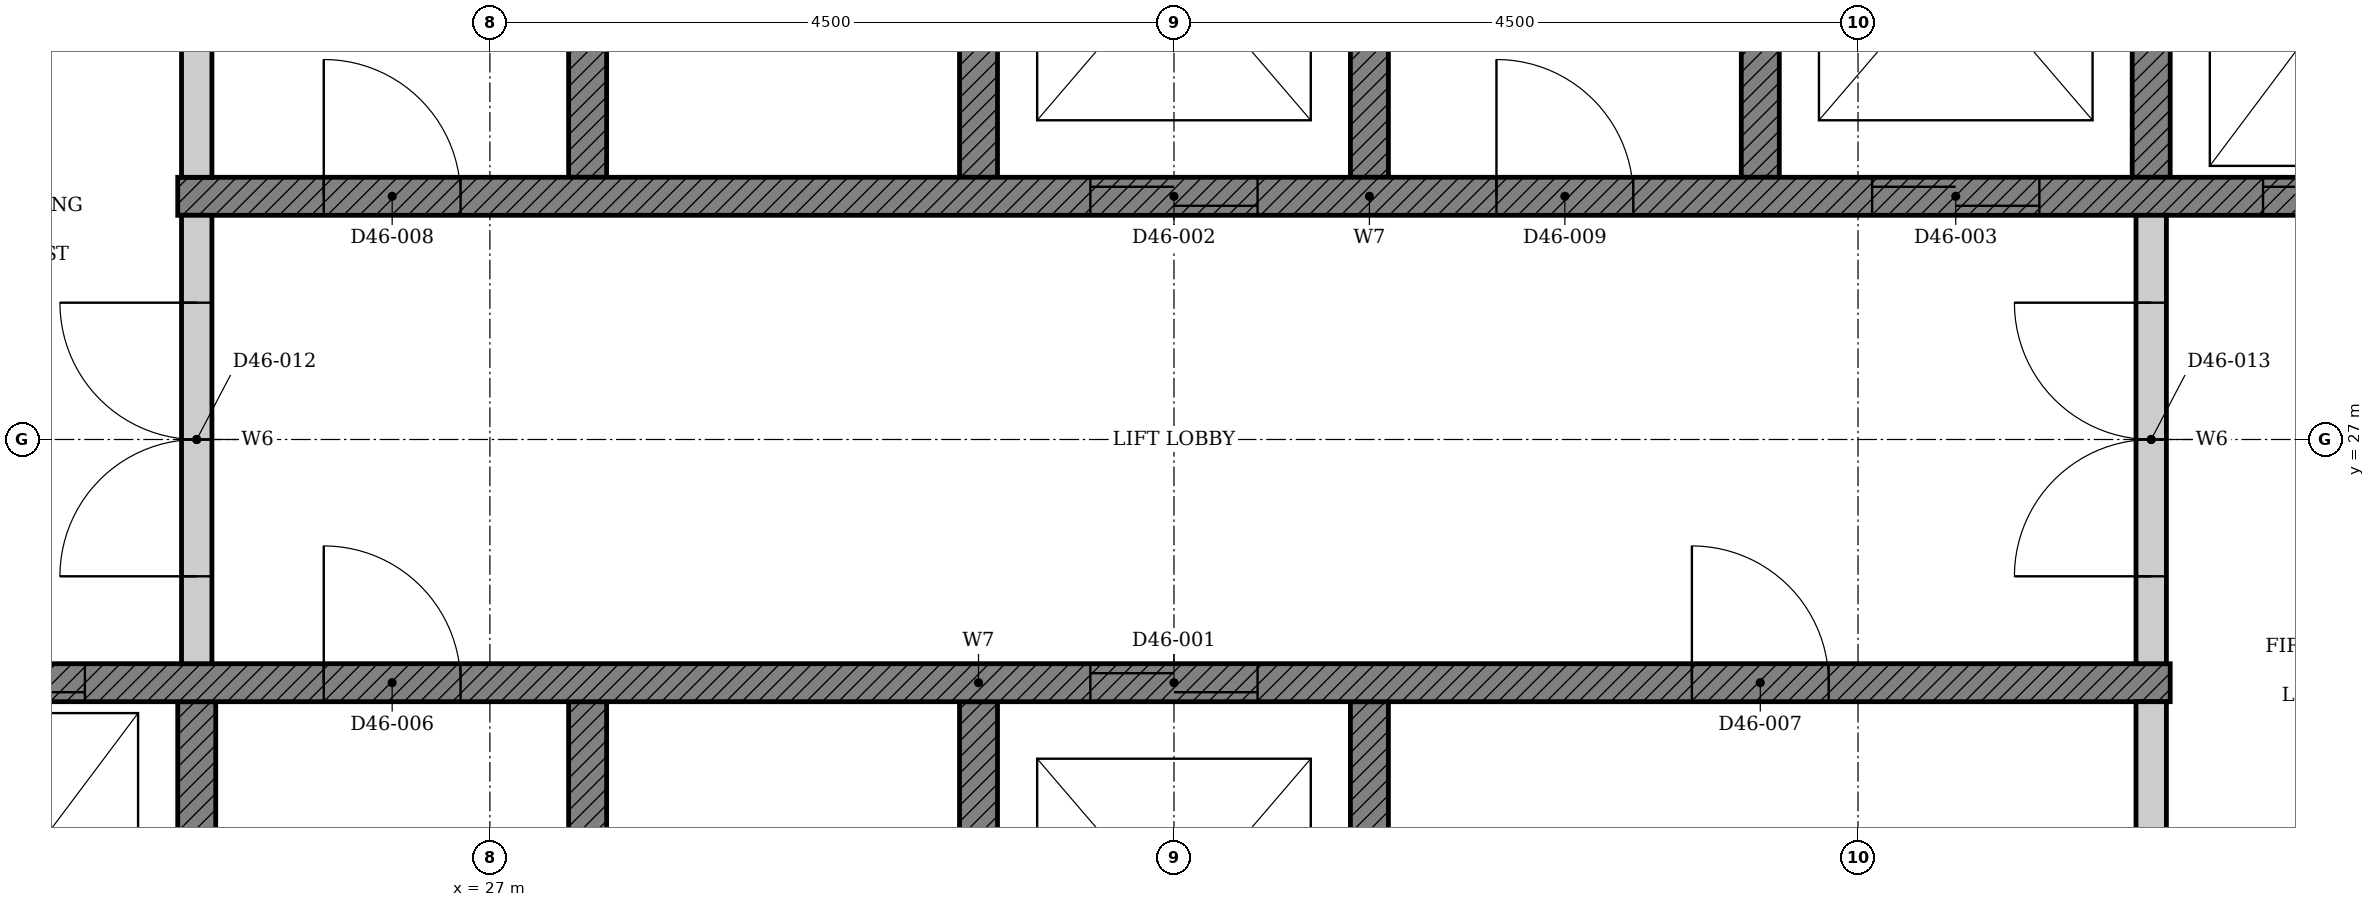
"""IFC4 building model, lengths in metres.
Left out: names, types, materials, properties, quantities, classifications, styles, units other than length and angle.
Written with IfcOpenShell. Run it as: python <this file> out.ifc"""

import sys

from ifc_helpers import new_model, si_unit, direction, frame, frame_2d, origin, place, context, subcontext, project, spatial, polyline, rectangle, outline, extrude, element, fill, save


model = new_model("IFC4")
c1 = context("Model", 3, precision=1e-05, world=origin(), true_north=direction((0.0, 1.0)))
c2 = subcontext(c1, "Body", "Model", "MODEL_VIEW")
j1 = project(units=[si_unit("LENGTHUNIT", "METRE"), si_unit("PLANEANGLEUNIT", "RADIAN")], contexts=[c1])
p1 = place(None, origin())
s1 = spatial("IfcSite", under=j1, at=p1, CompositionType="ELEMENT")
p2 = place(p1, origin())
s2 = spatial("IfcBuilding", under=s1, at=p2, CompositionType="ELEMENT")
p3 = place(p2, frame((0.0, 0.0, 183.9)))
s3 = spatial("IfcBuildingStorey", under=s2, at=p3, CompositionType="ELEMENT", Elevation=183.9)
p4 = place(p3, origin())
e1 = element("IfcWall", 1, at=p4, inside=s3, PredefinedType="SHEAR", context=c2, shape_type="SweptSolid", body=[
    extrude(outline(polyline([(22.375, 22.35), (25.197, 22.35), (25.197, 25.275), (24.947, 25.275), (24.947, 22.65), (22.625, 22.65), (22.625, 25.275), (22.375, 25.275), (22.375, 22.35)])), origin(), (0.0, 0.0, 1.0), 3.3),
])
p5 = place(p3, origin())
e2 = element("IfcWall", 2, at=p5, inside=s3, PredefinedType="SHEAR", context=c2, shape_type="SweptSolid", body=[
    extrude(outline(polyline([(27.518, 22.35), (32.911, 22.35), (32.911, 25.275), (32.661, 25.275), (32.661, 22.65), (30.339, 22.65), (30.339, 25.275), (30.089, 25.275), (30.089, 22.65), (27.768, 22.65), (27.768, 25.275), (27.518, 25.275), (27.518, 22.35)])), origin(), (0.0, 0.0, 1.0), 3.3),
])
p6 = place(p3, origin())
e3 = element("IfcWall", 3, at=p6, inside=s3, PredefinedType="SHEAR", context=c2, shape_type="SweptSolid", body=[
    extrude(outline(polyline([(27.518, 28.725), (27.768, 28.725), (27.768, 31.35), (30.089, 31.35), (30.089, 28.725), (30.339, 28.725), (30.339, 31.35), (32.661, 31.35), (32.661, 28.725), (32.911, 28.725), (32.911, 31.65), (27.518, 31.65), (27.518, 28.725)])), origin(), (0.0, 0.0, 1.0), 3.3),
])
p7 = place(p3, origin())
e4 = element("IfcWall", 4, at=p7, inside=s3, PredefinedType="SHEAR", context=c2, shape_type="SweptSolid", body=[
    extrude(outline(polyline([(35.232, 28.725), (35.482, 28.725), (35.482, 31.35), (37.803, 31.35), (37.803, 28.725), (38.053, 28.725), (38.053, 31.35), (40.375, 31.35), (40.375, 28.725), (40.625, 28.725), (40.625, 31.65), (35.232, 31.65), (35.232, 28.725)])), origin(), (0.0, 0.0, 1.0), 3.3),
])
p8 = place(p3, frame((22.375, 25.4, 0.0), z_axis=(0.0, 0.0, 1.0), x_axis=(1.0, 0.0, 0.0)))
e5 = element("IfcWall", 5, at=p8, inside=s3, PredefinedType="SHEAR", context=c2, shape_type="SweptSolid", body=[
    extrude(rectangle(XDim=15.678, YDim=0.25, at=frame_2d((7.839, 0.0))), origin(), (0.0, 0.0, 1.0), 3.3),
])
p9 = place(p8, frame((8.575, 0.0, 0.0)))
e6 = element("IfcOpeningElement", 6, at=p9, cuts=e5, PredefinedType="OPENING", context=c2, shape_type="SweptSolid", body=[
    extrude(rectangle(XDim=1.1, YDim=2.1, at=frame_2d((0.55, 1.05))), frame((0.0, 0.135, 0.0), z_axis=(0.0, -1.0, 0.0), x_axis=(1.0, 0.0, 0.0)), (0.0, 0.0, 1.0), 0.27),
])
p10 = place(p8, frame((0.861, 0.0, 0.0)))
e7 = element("IfcOpeningElement", 7, at=p10, cuts=e5, PredefinedType="OPENING", context=c2, shape_type="SweptSolid", body=[
    extrude(rectangle(XDim=1.1, YDim=2.1, at=frame_2d((0.55, 1.05))), frame((0.0, 0.135, 0.0), z_axis=(0.0, -1.0, 0.0), x_axis=(1.0, 0.0, 0.0)), (0.0, 0.0, 1.0), 0.27),
])
p11 = place(p8, frame((3.532, 0.0, 0.0)))
e8 = element("IfcOpeningElement", 8, at=p11, cuts=e5, PredefinedType="OPENING", context=c2, shape_type="SweptSolid", body=[
    extrude(rectangle(XDim=0.9, YDim=2.1, at=frame_2d((0.45, 1.05))), frame((0.0, 0.135, 0.0), z_axis=(0.0, -1.0, 0.0), x_axis=(1.0, 0.0, 0.0)), (0.0, 0.0, 1.0), 0.27),
])
p12 = place(p8, frame((12.532, 0.0, 0.0)))
e9 = element("IfcOpeningElement", 9, at=p12, cuts=e5, PredefinedType="OPENING", context=c2, shape_type="SweptSolid", body=[
    extrude(rectangle(XDim=0.9, YDim=2.1, at=frame_2d((0.45, 1.05))), frame((0.0, 0.135, 0.0), z_axis=(0.0, -1.0, 0.0), x_axis=(1.0, 0.0, 0.0)), (0.0, 0.0, 1.0), 0.27),
])
p13 = place(p3, frame((24.947, 28.6, 0.0), z_axis=(0.0, 0.0, 1.0), x_axis=(1.0, 0.0, 0.0)))
e10 = element("IfcWall", 10, at=p13, inside=s3, PredefinedType="SHEAR", context=c2, shape_type="SweptSolid", body=[
    extrude(rectangle(XDim=15.678, YDim=0.25, at=frame_2d((7.839, 0.0))), origin(), (0.0, 0.0, 1.0), 3.3),
])
p14 = place(p13, frame((6.004, 0.0, 0.0)))
e11 = element("IfcOpeningElement", 11, at=p14, cuts=e10, PredefinedType="OPENING", context=c2, shape_type="SweptSolid", body=[
    extrude(rectangle(XDim=1.1, YDim=2.1, at=frame_2d((0.55, 1.05))), frame((0.0, 0.135, 0.0), z_axis=(0.0, -1.0, 0.0), x_axis=(1.0, 0.0, 0.0)), (0.0, 0.0, 1.0), 0.27),
])
p15 = place(p13, frame((11.146, 0.0, 0.0)))
e12 = element("IfcOpeningElement", 12, at=p15, cuts=e10, PredefinedType="OPENING", context=c2, shape_type="SweptSolid", body=[
    extrude(rectangle(XDim=1.1, YDim=2.1, at=frame_2d((0.55, 1.05))), frame((0.0, 0.135, 0.0), z_axis=(0.0, -1.0, 0.0), x_axis=(1.0, 0.0, 0.0)), (0.0, 0.0, 1.0), 0.27),
])
p16 = place(p13, frame((13.718, 0.0, 0.0)))
e13 = element("IfcOpeningElement", 13, at=p16, cuts=e10, PredefinedType="OPENING", context=c2, shape_type="SweptSolid", body=[
    extrude(rectangle(XDim=1.1, YDim=2.1, at=frame_2d((0.55, 1.05))), frame((0.0, 0.135, 0.0), z_axis=(0.0, -1.0, 0.0), x_axis=(1.0, 0.0, 0.0)), (0.0, 0.0, 1.0), 0.27),
])
p17 = place(p13, frame((0.961, 0.0, 0.0)))
e14 = element("IfcOpeningElement", 14, at=p17, cuts=e10, PredefinedType="OPENING", context=c2, shape_type="SweptSolid", body=[
    extrude(rectangle(XDim=0.9, YDim=2.1, at=frame_2d((0.45, 1.05))), frame((0.0, 0.135, 0.0), z_axis=(0.0, -1.0, 0.0), x_axis=(1.0, 0.0, 0.0)), (0.0, 0.0, 1.0), 0.27),
])
p18 = place(p13, frame((8.675, 0.0, 0.0)))
e15 = element("IfcOpeningElement", 15, at=p18, cuts=e10, PredefinedType="OPENING", context=c2, shape_type="SweptSolid", body=[
    extrude(rectangle(XDim=0.9, YDim=2.1, at=frame_2d((0.45, 1.05))), frame((0.0, 0.135, 0.0), z_axis=(0.0, -1.0, 0.0), x_axis=(1.0, 0.0, 0.0)), (0.0, 0.0, 1.0), 0.27),
])
for number, where, z_axis, x_axis in (
    (16, (37.928, 22.65, 0.0), (0.0, 0.0, 1.0), (0.0, 1.0, 0.0)),
    (17, (25.072, 28.725, 0.0), (0.0, 0.0, 1.0), (0.0, 1.0, 0.0)),
):
    element("IfcWall", number, at=place(p3, frame(where, z_axis=z_axis, x_axis=x_axis)), inside=s3, PredefinedType="PARTITIONING", context=c2, shape_type="SweptSolid", body=[
        extrude(rectangle(XDim=2.625, YDim=0.2, at=frame_2d((1.312, 0.0))), origin(), (0.0, 0.0, 1.0), 3.3),
    ])
p19 = place(p3, frame((25.072, 25.525, 0.0), z_axis=(0.0, 0.0, 1.0), x_axis=(0.0, 1.0, 0.0)))
e18 = element("IfcWall", 18, at=p19, inside=s3, PredefinedType="PARTITIONING", context=c2, shape_type="SweptSolid", body=[
    extrude(rectangle(XDim=2.95, YDim=0.2, at=frame_2d((1.475, 0.0))), origin(), (0.0, 0.0, 1.0), 3.3),
])
p20 = place(p19, frame((0.575, 0.0, 0.0)))
e19 = element("IfcOpeningElement", 19, at=p20, cuts=e18, PredefinedType="OPENING", context=c2, shape_type="SweptSolid", body=[
    extrude(rectangle(XDim=1.8, YDim=2.1, at=frame_2d((0.9, 1.05))), frame((0.0, 0.11, 0.0), z_axis=(0.0, -1.0, 0.0), x_axis=(1.0, 0.0, 0.0)), (0.0, 0.0, 1.0), 0.22),
])
p21 = place(p3, frame((37.928, 25.525, 0.0), z_axis=(0.0, 0.0, 1.0), x_axis=(0.0, 1.0, 0.0)))
e20 = element("IfcWall", 20, at=p21, inside=s3, PredefinedType="PARTITIONING", context=c2, shape_type="SweptSolid", body=[
    extrude(rectangle(XDim=2.95, YDim=0.2, at=frame_2d((1.475, 0.0))), origin(), (0.0, 0.0, 1.0), 3.3),
])
p22 = place(p21, frame((0.575, 0.0, 0.0)))
e21 = element("IfcOpeningElement", 21, at=p22, cuts=e20, PredefinedType="OPENING", context=c2, shape_type="SweptSolid", body=[
    extrude(rectangle(XDim=1.8, YDim=2.1, at=frame_2d((0.9, 1.05))), frame((0.0, 0.11, 0.0), z_axis=(0.0, -1.0, 0.0), x_axis=(1.0, 0.0, 0.0)), (0.0, 0.0, 1.0), 0.22),
])
p23 = place(p9, origin())
e22 = element("IfcDoor", 22, at=p23, inside=s3, OperationType="DOUBLE_DOOR_SLIDING", PredefinedType="DOOR", context=c2, shape_type="SweptSolid", body=[
    extrude(rectangle(XDim=1.1, YDim=2.1, at=frame_2d((0.55, 1.05))), frame((0.0, 0.025, 0.0), z_axis=(0.0, -1.0, 0.0), x_axis=(1.0, 0.0, 0.0)), (0.0, 0.0, 1.0), 0.05),
])
fill(e6, e22)
p24 = place(p14, origin())
e23 = element("IfcDoor", 23, at=p24, inside=s3, OperationType="DOUBLE_DOOR_SLIDING", PredefinedType="DOOR", context=c2, shape_type="SweptSolid", body=[
    extrude(rectangle(XDim=1.1, YDim=2.1, at=frame_2d((0.55, 1.05))), frame((0.0, 0.025, 0.0), z_axis=(0.0, -1.0, 0.0), x_axis=(1.0, 0.0, 0.0)), (0.0, 0.0, 1.0), 0.05),
])
fill(e11, e23)
p25 = place(p15, origin())
e24 = element("IfcDoor", 24, at=p25, inside=s3, OperationType="DOUBLE_DOOR_SLIDING", PredefinedType="DOOR", context=c2, shape_type="SweptSolid", body=[
    extrude(rectangle(XDim=1.1, YDim=2.1, at=frame_2d((0.55, 1.05))), frame((0.0, 0.025, 0.0), z_axis=(0.0, -1.0, 0.0), x_axis=(1.0, 0.0, 0.0)), (0.0, 0.0, 1.0), 0.05),
])
fill(e12, e24)
p26 = place(p10, origin())
e25 = element("IfcDoor", 25, at=p26, inside=s3, OperationType="DOUBLE_DOOR_SLIDING", PredefinedType="DOOR", context=c2, shape_type="SweptSolid", body=[
    extrude(rectangle(XDim=1.1, YDim=2.1, at=frame_2d((0.55, 1.05))), frame((0.0, 0.025, 0.0), z_axis=(0.0, -1.0, 0.0), x_axis=(1.0, 0.0, 0.0)), (0.0, 0.0, 1.0), 0.05),
])
fill(e7, e25)
p27 = place(p16, origin())
e26 = element("IfcDoor", 26, at=p27, inside=s3, OperationType="DOUBLE_DOOR_SLIDING", PredefinedType="DOOR", context=c2, shape_type="SweptSolid", body=[
    extrude(rectangle(XDim=1.1, YDim=2.1, at=frame_2d((0.55, 1.05))), frame((0.0, 0.025, 0.0), z_axis=(0.0, -1.0, 0.0), x_axis=(1.0, 0.0, 0.0)), (0.0, 0.0, 1.0), 0.05),
])
fill(e13, e26)
p28 = place(p11, origin())
e27 = element("IfcDoor", 27, at=p28, inside=s3, OperationType="SINGLE_SWING_LEFT", PredefinedType="DOOR", context=c2, shape_type="SweptSolid", body=[
    extrude(rectangle(XDim=0.9, YDim=2.1, at=frame_2d((0.45, 1.05))), frame((0.0, 0.025, 0.0), z_axis=(0.0, -1.0, 0.0), x_axis=(1.0, 0.0, 0.0)), (0.0, 0.0, 1.0), 0.05),
])
fill(e8, e27)
p29 = place(p12, origin())
e28 = element("IfcDoor", 28, at=p29, inside=s3, OperationType="SINGLE_SWING_LEFT", PredefinedType="DOOR", context=c2, shape_type="SweptSolid", body=[
    extrude(rectangle(XDim=0.9, YDim=2.1, at=frame_2d((0.45, 1.05))), frame((0.0, 0.025, 0.0), z_axis=(0.0, -1.0, 0.0), x_axis=(1.0, 0.0, 0.0)), (0.0, 0.0, 1.0), 0.05),
])
fill(e9, e28)
p30 = place(p17, origin())
e29 = element("IfcDoor", 29, at=p30, inside=s3, OperationType="SINGLE_SWING_LEFT", PredefinedType="DOOR", context=c2, shape_type="SweptSolid", body=[
    extrude(rectangle(XDim=0.9, YDim=2.1, at=frame_2d((0.45, 1.05))), frame((0.0, 0.025, 0.0), z_axis=(0.0, -1.0, 0.0), x_axis=(1.0, 0.0, 0.0)), (0.0, 0.0, 1.0), 0.05),
])
fill(e14, e29)
p31 = place(p18, origin())
e30 = element("IfcDoor", 30, at=p31, inside=s3, OperationType="SINGLE_SWING_LEFT", PredefinedType="DOOR", context=c2, shape_type="SweptSolid", body=[
    extrude(rectangle(XDim=0.9, YDim=2.1, at=frame_2d((0.45, 1.05))), frame((0.0, 0.025, 0.0), z_axis=(0.0, -1.0, 0.0), x_axis=(1.0, 0.0, 0.0)), (0.0, 0.0, 1.0), 0.05),
])
fill(e15, e30)
p32 = place(p20, origin())
e31 = element("IfcDoor", 31, at=p32, inside=s3, OperationType="DOUBLE_DOOR_SINGLE_SWING", PredefinedType="DOOR", context=c2, shape_type="SweptSolid", body=[
    extrude(rectangle(XDim=1.8, YDim=2.1, at=frame_2d((0.9, 1.05))), frame((0.0, 0.025, 0.0), z_axis=(0.0, -1.0, 0.0), x_axis=(1.0, 0.0, 0.0)), (0.0, 0.0, 1.0), 0.05),
])
fill(e19, e31)
p33 = place(p22, origin())
e32 = element("IfcDoor", 32, at=p33, inside=s3, OperationType="DOUBLE_DOOR_SINGLE_SWING", PredefinedType="DOOR", context=c2, shape_type="SweptSolid", body=[
    extrude(rectangle(XDim=1.8, YDim=2.1, at=frame_2d((0.9, 1.05))), frame((0.0, 0.025, 0.0), z_axis=(0.0, -1.0, 0.0), x_axis=(1.0, 0.0, 0.0)), (0.0, 0.0, 1.0), 0.05),
])
fill(e21, e32)
save(model, sys.argv[1])
